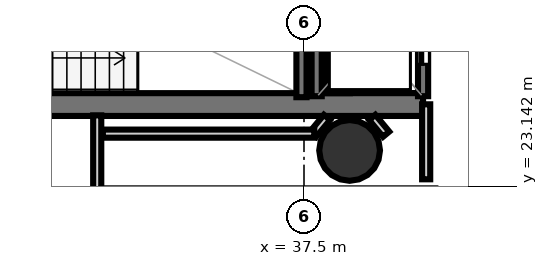
"""IFC4 building model, lengths in metres.
Left out: names, types, materials, properties, quantities, classifications, styles, units other than length and angle.
Written with IfcOpenShell. Run it as: python <this file> out.ifc"""

import sys

from ifc_helpers import new_model, si_unit, direction, frame, frame_2d, origin, origin_2d, place, context, subcontext, project, spatial, rectangle, hollow_circle, extrude, element, fill, save


model = new_model("IFC4")
c1 = context("Model", 3, precision=1e-05, world=origin(), true_north=direction((0.0, 1.0)))
c2 = subcontext(c1, "Body", "Model", "MODEL_VIEW")
j1 = project(units=[si_unit("LENGTHUNIT", "METRE"), si_unit("PLANEANGLEUNIT", "RADIAN")], contexts=[c1])
p1 = place(None, origin())
s1 = spatial("IfcSite", under=j1, at=p1, CompositionType="ELEMENT")
p2 = place(p1, origin())
s2 = spatial("IfcBuilding", under=s1, at=p2, CompositionType="ELEMENT")
p3 = place(p2, frame((0.0, 0.0, 226.2)))
s3 = spatial("IfcBuildingStorey", under=s2, at=p3, CompositionType="ELEMENT", Elevation=226.2)
p4 = place(p3, frame((29.33, 24.755, 0.0), z_axis=(0.0, 0.0, 1.0), x_axis=(1.0, 0.0, 0.0)))
e1 = element("IfcWall", 1, at=p4, inside=s3, PredefinedType="SHEAR", context=c2, shape_type="SweptSolid", body=[
    extrude(rectangle(XDim=10.52, YDim=0.45, at=frame_2d((5.26, 0.0))), origin(), (0.0, 0.0, 1.0), 3.4),
])
p5 = place(p4, frame((0.695, 0.0, 0.0)))
e2 = element("IfcOpeningElement", 2, at=p5, cuts=e1, PredefinedType="OPENING", context=c2, shape_type="SweptSolid", body=[
    extrude(rectangle(XDim=1.25, YDim=2.15, at=frame_2d((0.625, 1.075))), frame((0.0, 0.235, 0.0), z_axis=(0.0, -1.0, 0.0), x_axis=(1.0, 0.0, 0.0)), (0.0, 0.0, 1.0), 0.47),
])
p6 = place(p3, frame((38.18, 24.98, 0.0), z_axis=(0.0, 0.0, 1.0), x_axis=(0.0, 1.0, 0.0)))
e3 = element("IfcWall", 3, at=p6, inside=s3, PredefinedType="SHEAR", context=c2, shape_type="SweptSolid", body=[
    extrude(rectangle(XDim=7.44, YDim=0.45, at=frame_2d((3.72, 0.0))), origin(), (0.0, 0.0, 1.0), 3.4),
])
p7 = place(p3, frame((38.4, 23.85, 0.0), z_axis=(0.0, 0.0, 1.0), x_axis=(1.0, 0.0, 0.0)))
e4 = element("IfcColumn", 4, at=p7, inside=s3, PredefinedType="COLUMN", context=c2, shape_type="SweptSolid", body=[
    extrude(hollow_circle(Radius=0.6, WallThickness=0.03, at=origin_2d()), origin(), (0.0, 0.0, 1.0), 3.7),
])
p8 = place(p3, frame((37.45, 24.9, 0.0), z_axis=(0.0, 0.0, 1.0), x_axis=(0.0, 1.0, 0.0)))
e5 = element("IfcWall", 5, at=p8, inside=s3, PredefinedType="SOLIDWALL", context=c2, shape_type="SweptSolid", body=[
    extrude(rectangle(XDim=3.06, YDim=0.2, at=frame_2d((1.53, 0.0))), origin(), (0.0, 0.0, 1.0), 3.4),
])
p9 = place(p3, frame((39.85, 24.92, 0.0), z_axis=(0.0, 0.0, 1.0), x_axis=(0.0, 1.0, 0.0)))
e6 = element("IfcWall", 6, at=p9, inside=s3, PredefinedType="SOLIDWALL", context=c2, shape_type="SweptSolid", body=[
    extrude(rectangle(XDim=2.36, YDim=0.2, at=frame_2d((1.18, 0.0))), origin(), (0.0, 0.0, 1.0), 3.4),
])
p10 = place(p9, frame((0.63, 0.0, 0.0)))
e7 = element("IfcOpeningElement", 7, at=p10, cuts=e6, PredefinedType="OPENING", context=c2, shape_type="SweptSolid", body=[
    extrude(rectangle(XDim=1.1, YDim=2.15, at=frame_2d((0.55, 1.075))), frame((0.0, 0.11, 0.0), z_axis=(0.0, -1.0, 0.0), x_axis=(1.0, 0.0, 0.0)), (0.0, 0.0, 1.0), 0.22),
])
p11 = place(p3, frame((37.75, 24.92, 0.0), z_axis=(0.0, 0.0, 1.0), x_axis=(0.0, 1.0, 0.0)))
e8 = element("IfcWall", 8, at=p11, inside=s3, PredefinedType="SOLIDWALL", context=c2, shape_type="SweptSolid", body=[
    extrude(rectangle(XDim=2.36, YDim=0.2, at=frame_2d((1.18, 0.0))), origin(), (0.0, 0.0, 1.0), 3.4),
])
p12 = place(p3, frame((33.419, 24.542, 0.0), z_axis=(0.0, 0.0, 1.0), x_axis=(0.0, -1.0, 0.0)))
e9 = element("IfcWall", 9, at=p12, inside=s3, PredefinedType="PARTITIONING", context=c2, shape_type="SweptSolid", body=[
    extrude(rectangle(XDim=2.692, YDim=0.16, at=frame_2d((1.346, 0.0))), origin(), (0.0, 0.0, 1.0), 2.72),
])
p13 = place(p3, frame((39.911, 23.28, 0.0), z_axis=(0.0, 0.0, 1.0), x_axis=(0.0, 1.0, 0.0)))
e10 = element("IfcWall", 10, at=p13, inside=s3, PredefinedType="PARTITIONING", context=c2, shape_type="SweptSolid", body=[
    extrude(rectangle(XDim=1.48, YDim=0.16, at=frame_2d((0.74, 0.0))), origin(), (0.0, 0.0, 1.0), 2.72),
])
for number, where, z_axis, x_axis in (
    (11, (39.121, 24.17, 0.0), (0.0, 0.0, 1.0), (-0.638, 0.77, 0.0)),
    (12, (37.954, 24.502, 0.0), (0.0, 0.0, 1.0), (-0.638, -0.77, 0.0)),
):
    element("IfcWall", number, at=place(p3, frame(where, z_axis=z_axis, x_axis=x_axis)), inside=s3, PredefinedType="PARTITIONING", context=c2, shape_type="SweptSolid", body=[
        extrude(rectangle(XDim=0.431, YDim=0.16, at=frame_2d((0.215, 0.0))), origin(), (0.0, 0.0, 1.0), 2.72),
    ])
p14 = place(p3, frame((37.703, 24.181, 0.0), z_axis=(0.0, 0.0, 1.0), x_axis=(-1.0, 0.0, 0.0)))
e13 = element("IfcWall", 13, at=p14, inside=s3, PredefinedType="PARTITIONING", context=c2, shape_type="SweptSolid", body=[
    extrude(rectangle(XDim=4.173, YDim=0.16, at=frame_2d((2.086, 0.0))), origin(), (0.0, 0.0, 1.0), 2.72),
])
p15 = place(p10, origin())
e14 = element("IfcDoor", 14, at=p15, inside=s3, OperationType="SLIDING_TO_LEFT", PredefinedType="DOOR", context=c2, shape_type="SweptSolid", body=[
    extrude(rectangle(XDim=1.1, YDim=2.15, at=frame_2d((0.55, 1.075))), frame((0.0, 0.025, 0.0), z_axis=(0.0, -1.0, 0.0), x_axis=(1.0, 0.0, 0.0)), (0.0, 0.0, 1.0), 0.05),
])
fill(e7, e14)
save(model, sys.argv[1])
